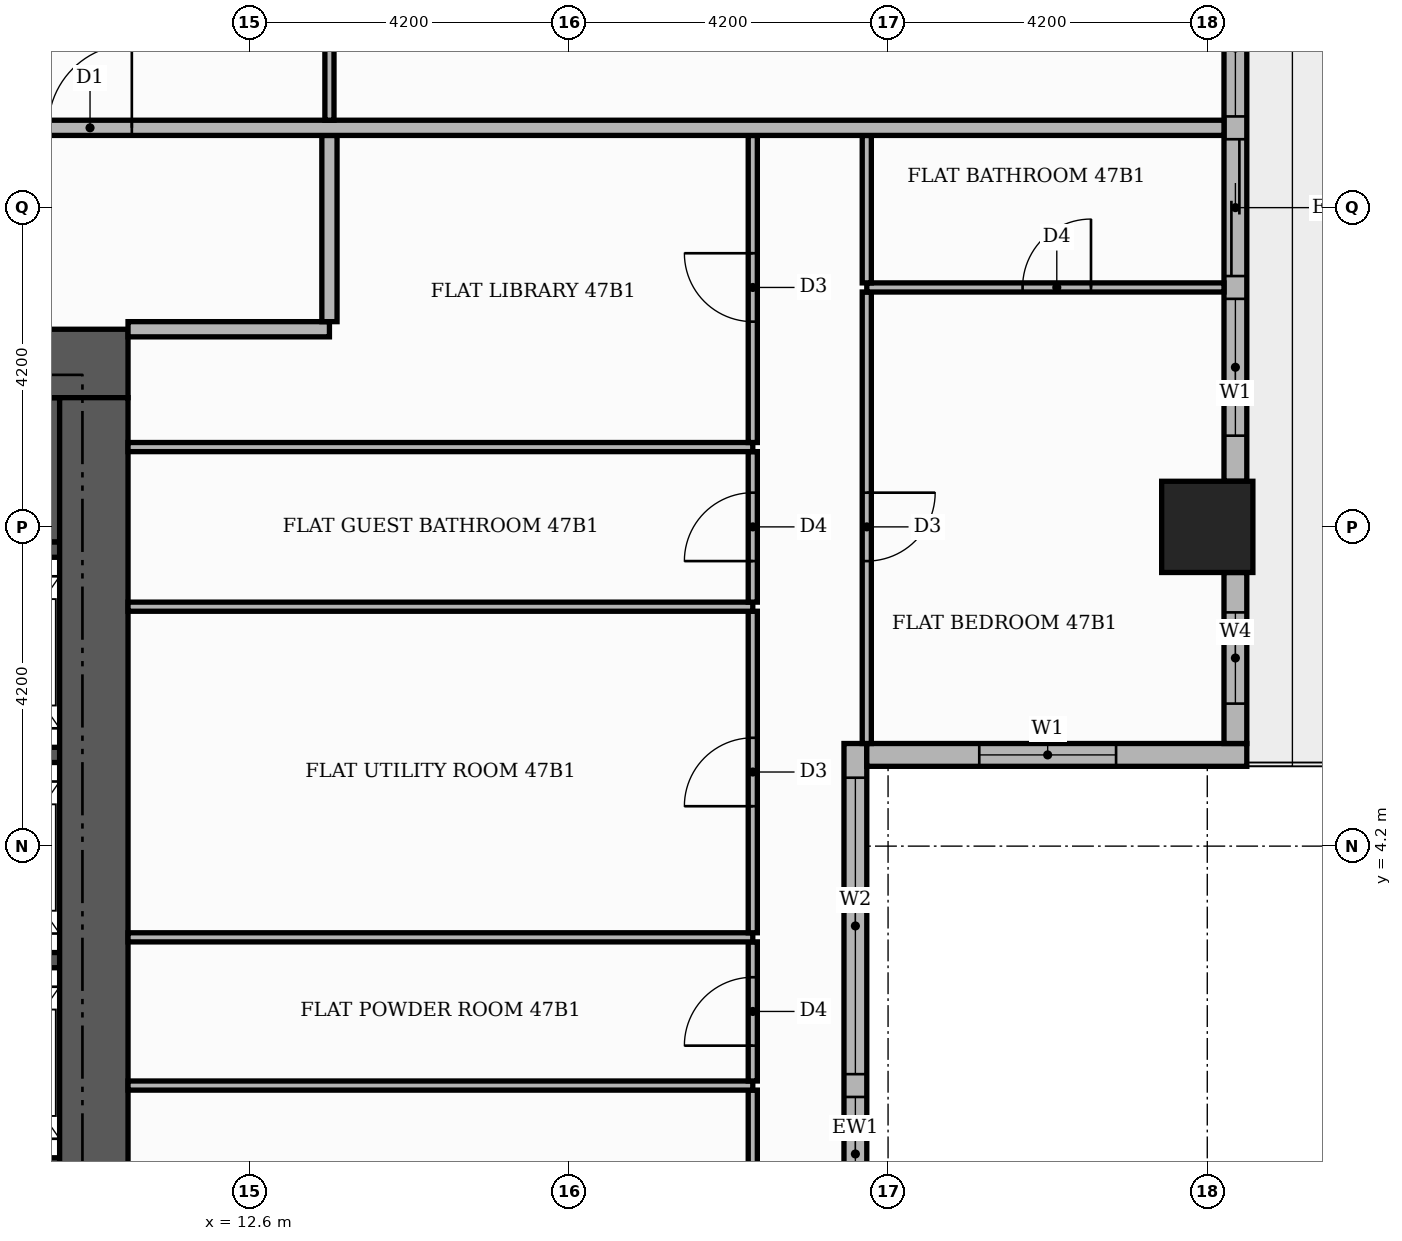
"""IFC4 building model, lengths in metres.
Left out: names, types, materials, properties, quantities, classifications, styles, units other than length and angle.
Written with IfcOpenShell. Run it as: python <this file> out.ifc"""

import sys

from ifc_helpers import new_model, si_unit, direction, frame, frame_2d, origin, origin_2d, place, context, subcontext, project, spatial, rectangle, extrude, element, fill, save


model = new_model("IFC4")
c1 = context("Model", 3, precision=1e-05, world=origin(), true_north=direction((0.0, 1.0)))
c2 = subcontext(c1, "Body", "Model", "MODEL_VIEW")
j1 = project(units=[si_unit("LENGTHUNIT", "METRE"), si_unit("PLANEANGLEUNIT", "RADIAN")], contexts=[c1])
p1 = place(None, origin())
s1 = spatial("IfcSite", under=j1, at=p1, CompositionType="ELEMENT")
p2 = place(p1, origin())
s2 = spatial("IfcBuilding", under=s1, at=p2, CompositionType="ELEMENT")
p3 = place(p2, frame((0.0, 0.0, 200.1)))
s3 = spatial("IfcBuildingStorey", under=s2, at=p3, CompositionType="ELEMENT", Elevation=200.1)
p4 = place(p3, frame((5.5, 9.15, 0.0), z_axis=(0.0, 0.0, 1.0), x_axis=(1.0, 0.0, 0.0)))
e1 = element("IfcWall", 1, at=p4, inside=s3, PredefinedType="SHEAR", context=c2, shape_type="SweptSolid", body=[
    extrude(rectangle(XDim=4.6, YDim=1.9, at=frame_2d((2.3, 0.0))), origin(), (0.0, 0.0, 1.0), 3.48),
])
for number, where, z_axis, x_axis in (
    (2, (8.1, 0.0, 0.0), (0.0, 0.0, 1.0), (1.0, 0.0, 0.0)),
    (3, (8.1, 2.7, 0.0), (0.0, 0.0, 1.0), (1.0, 0.0, 0.0)),
    (4, (8.1, 5.4, 0.0), (0.0, 0.0, 1.0), (1.0, 0.0, 0.0)),
    (5, (8.1, 8.1, 0.0), (0.0, 0.0, 1.0), (1.0, 0.0, 0.0)),
):
    element("IfcWall", number, at=place(p3, frame(where, z_axis=z_axis, x_axis=x_axis)), inside=s3, PredefinedType="SHEAR", context=c2, shape_type="SweptSolid", body=[
        extrude(rectangle(XDim=2.0, YDim=0.2, at=frame_2d((1.0, 0.0))), origin(), (0.0, 0.0, 1.0), 3.48),
    ])
p5 = place(p3, frame((-11.0, 10.55, 0.0), z_axis=(0.0, 0.0, 1.0), x_axis=(1.0, 0.0, 0.0)))
e6 = element("IfcWall", 6, at=p5, inside=s3, PredefinedType="SHEAR", context=c2, shape_type="SweptSolid", body=[
    extrude(rectangle(XDim=22.0, YDim=0.9, at=frame_2d((11.0, 0.0))), origin(), (0.0, 0.0, 1.0), 3.48),
])
p6 = place(p5, frame((13.3, 0.0, 0.0)))
e7 = element("IfcOpeningElement", 7, at=p6, cuts=e6, PredefinedType="OPENING", context=c2, shape_type="SweptSolid", body=[
    extrude(rectangle(XDim=1.8, YDim=2.2, at=frame_2d((0.9, 1.1))), frame((0.0, 0.46, 0.0), z_axis=(0.0, -1.0, 0.0), x_axis=(1.0, 0.0, 0.0)), (0.0, 0.0, 1.0), 0.92),
])
p7 = place(p3, frame((10.55, -10.1, 0.0), z_axis=(0.0, 0.0, 1.0), x_axis=(0.0, 1.0, 0.0)))
e8 = element("IfcWall", 8, at=p7, inside=s3, PredefinedType="SHEAR", context=c2, shape_type="SweptSolid", body=[
    extrude(rectangle(XDim=20.2, YDim=0.9, at=frame_2d((10.1, 0.0))), origin(), (0.0, 0.0, 1.0), 3.48),
])
p8 = place(p3, frame((25.2, 8.4, 0.0), z_axis=(0.0, 0.0, 1.0), x_axis=(1.0, 0.0, 0.0)))
e9 = element("IfcColumn", 9, at=p8, inside=s3, PredefinedType="COLUMN", context=c2, shape_type="SweptSolid", body=[
    extrude(rectangle(XDim=1.2, YDim=1.2, at=origin_2d()), origin(), (0.0, 0.0, 1.0), 3.9),
])
p9 = place(p3, frame((20.57, -5.25, 0.0), z_axis=(0.0, 0.0, 1.0), x_axis=(0.0, 1.0, 0.0)))
e10 = element("IfcWall", 10, at=p9, inside=s3, PredefinedType="STANDARD", context=c2, shape_type="SweptSolid", body=[
    extrude(rectangle(XDim=10.8, YDim=0.3, at=frame_2d((5.4, 0.0))), origin(), (0.0, 0.0, 1.0), 3.48),
])
p10 = place(p9, frame((0.15, 0.0, 0.9)))
e11 = element("IfcOpeningElement", 11, at=p10, cuts=e10, PredefinedType="OPENING", context=c2, shape_type="SweptSolid", body=[
    extrude(rectangle(XDim=6.0, YDim=2.1, at=frame_2d((3.0, 1.05))), frame((0.0, 0.16, 0.0), z_axis=(0.0, -1.0, 0.0), x_axis=(1.0, 0.0, 0.0)), (0.0, 0.0, 1.0), 0.32),
])
p11 = place(p9, frame((6.45, 0.0, 0.9)))
e12 = element("IfcOpeningElement", 12, at=p11, cuts=e10, PredefinedType="OPENING", context=c2, shape_type="SweptSolid", body=[
    extrude(rectangle(XDim=3.9, YDim=2.1, at=frame_2d((1.95, 1.05))), frame((0.0, 0.16, 0.0), z_axis=(0.0, -1.0, 0.0), x_axis=(1.0, 0.0, 0.0)), (0.0, 0.0, 1.0), 0.32),
])
p12 = place(p3, frame((20.72, 5.4, 0.0), z_axis=(0.0, 0.0, 1.0), x_axis=(1.0, 0.0, 0.0)))
e13 = element("IfcWall", 13, at=p12, inside=s3, PredefinedType="STANDARD", context=c2, shape_type="SweptSolid", body=[
    extrude(rectangle(XDim=5.0, YDim=0.3, at=frame_2d((2.5, 0.0))), origin(), (0.0, 0.0, 1.0), 3.48),
])
p13 = place(p12, frame((1.48, 0.0, 0.9)))
e14 = element("IfcOpeningElement", 14, at=p13, cuts=e13, PredefinedType="OPENING", context=c2, shape_type="SweptSolid", body=[
    extrude(rectangle(XDim=1.8, YDim=2.1, at=frame_2d((0.9, 1.05))), frame((0.0, 0.16, 0.0), z_axis=(0.0, -1.0, 0.0), x_axis=(1.0, 0.0, 0.0)), (0.0, 0.0, 1.0), 0.32),
])
p14 = place(p3, frame((25.57, 5.55, 0.0), z_axis=(0.0, 0.0, 1.0), x_axis=(0.0, 1.0, 0.0)))
e15 = element("IfcWall", 15, at=p14, inside=s3, PredefinedType="STANDARD", context=c2, shape_type="SweptSolid", body=[
    extrude(rectangle(XDim=2.25, YDim=0.3, at=frame_2d((1.125, 0.0))), origin(), (0.0, 0.0, 1.0), 3.48),
])
p15 = place(p14, frame((0.525, 0.0, 0.9)))
e16 = element("IfcOpeningElement", 16, at=p15, cuts=e15, PredefinedType="OPENING", context=c2, shape_type="SweptSolid", body=[
    extrude(rectangle(XDim=1.2, YDim=2.1, at=frame_2d((0.6, 1.05))), frame((0.0, 0.16, 0.0), z_axis=(0.0, -1.0, 0.0), x_axis=(1.0, 0.0, 0.0)), (0.0, 0.0, 1.0), 0.32),
])
p16 = place(p3, frame((25.57, 9.0, 0.0), z_axis=(0.0, 0.0, 1.0), x_axis=(0.0, 1.0, 0.0)))
e17 = element("IfcWall", 17, at=p16, inside=s3, PredefinedType="STANDARD", context=c2, shape_type="SweptSolid", body=[
    extrude(rectangle(XDim=7.2, YDim=0.3, at=frame_2d((3.6, 0.0))), origin(), (0.0, 0.0, 1.0), 3.48),
])
p17 = place(p16, frame((0.6, 0.0, 0.9)))
e18 = element("IfcOpeningElement", 18, at=p17, cuts=e17, PredefinedType="OPENING", context=c2, shape_type="SweptSolid", body=[
    extrude(rectangle(XDim=1.8, YDim=2.1, at=frame_2d((0.9, 1.05))), frame((0.0, 0.16, 0.0), z_axis=(0.0, -1.0, 0.0), x_axis=(1.0, 0.0, 0.0)), (0.0, 0.0, 1.0), 0.32),
])
p18 = place(p16, frame((2.7, 0.0, 0.0)))
e19 = element("IfcOpeningElement", 19, at=p18, cuts=e17, PredefinedType="OPENING", context=c2, shape_type="SweptSolid", body=[
    extrude(rectangle(XDim=1.8, YDim=2.4, at=frame_2d((0.9, 1.2))), frame((0.0, 0.16, 0.0), z_axis=(0.0, -1.0, 0.0), x_axis=(1.0, 0.0, 0.0)), (0.0, 0.0, 1.0), 0.32),
])
p19 = place(p16, frame((4.8, 0.0, 0.9)))
e20 = element("IfcOpeningElement", 20, at=p19, cuts=e17, PredefinedType="OPENING", context=c2, shape_type="SweptSolid", body=[
    extrude(rectangle(XDim=1.8, YDim=2.1, at=frame_2d((0.9, 1.05))), frame((0.0, 0.16, 0.0), z_axis=(0.0, -1.0, 0.0), x_axis=(1.0, 0.0, 0.0)), (0.0, 0.0, 1.0), 0.32),
])
p20 = place(p3, frame((19.22, -3.09, 0.0), z_axis=(0.0, 0.0, 1.0), x_axis=(0.0, 1.0, 0.0)))
e21 = element("IfcWall", 21, at=p20, inside=s3, PredefinedType="PARTITIONING", context=c2, shape_type="SweptSolid", body=[
    extrude(rectangle(XDim=4.08, YDim=0.12, at=frame_2d((2.04, 0.0))), origin(), (0.0, 0.0, 1.0), 3.48),
])
p21 = place(p20, frame((1.59, 0.0, 0.0)))
e22 = element("IfcOpeningElement", 22, at=p21, cuts=e21, PredefinedType="OPENING", context=c2, shape_type="SweptSolid", body=[
    extrude(rectangle(XDim=0.9, YDim=2.1, at=frame_2d((0.45, 1.05))), frame((0.0, 0.07, 0.0), z_axis=(0.0, -1.0, 0.0), x_axis=(1.0, 0.0, 0.0)), (0.0, 0.0, 1.0), 0.14),
])
p22 = place(p3, frame((11.0, 1.05, 0.0), z_axis=(0.0, 0.0, 1.0), x_axis=(1.0, 0.0, 0.0)))
e23 = element("IfcWall", 23, at=p22, inside=s3, PredefinedType="PARTITIONING", context=c2, shape_type="SweptSolid", body=[
    extrude(rectangle(XDim=8.22, YDim=0.12, at=frame_2d((4.11, 0.0))), origin(), (0.0, 0.0, 1.0), 3.48),
])
p23 = place(p3, frame((19.22, 1.11, 0.0), z_axis=(0.0, 0.0, 1.0), x_axis=(0.0, 1.0, 0.0)))
e24 = element("IfcWall", 24, at=p23, inside=s3, PredefinedType="PARTITIONING", context=c2, shape_type="SweptSolid", body=[
    extrude(rectangle(XDim=1.83, YDim=0.12, at=frame_2d((0.915, 0.0))), origin(), (0.0, 0.0, 1.0), 3.48),
])
p24 = place(p23, frame((0.465, 0.0, 0.0)))
e25 = element("IfcOpeningElement", 25, at=p24, cuts=e24, PredefinedType="OPENING", context=c2, shape_type="SweptSolid", body=[
    extrude(rectangle(XDim=0.9, YDim=2.1, at=frame_2d((0.45, 1.05))), frame((0.0, 0.07, 0.0), z_axis=(0.0, -1.0, 0.0), x_axis=(1.0, 0.0, 0.0)), (0.0, 0.0, 1.0), 0.14),
])
p25 = place(p3, frame((11.0, 3.0, 0.0), z_axis=(0.0, 0.0, 1.0), x_axis=(1.0, 0.0, 0.0)))
e26 = element("IfcWall", 26, at=p25, inside=s3, PredefinedType="PARTITIONING", context=c2, shape_type="SweptSolid", body=[
    extrude(rectangle(XDim=8.22, YDim=0.12, at=frame_2d((4.11, 0.0))), origin(), (0.0, 0.0, 1.0), 3.48),
])
p26 = place(p3, frame((19.22, 3.06, 0.0), z_axis=(0.0, 0.0, 1.0), x_axis=(0.0, 1.0, 0.0)))
e27 = element("IfcWall", 27, at=p26, inside=s3, PredefinedType="PARTITIONING", context=c2, shape_type="SweptSolid", body=[
    extrude(rectangle(XDim=4.23, YDim=0.12, at=frame_2d((2.115, 0.0))), origin(), (0.0, 0.0, 1.0), 3.48),
])
p27 = place(p26, frame((1.665, 0.0, 0.0)))
e28 = element("IfcOpeningElement", 28, at=p27, cuts=e27, PredefinedType="OPENING", context=c2, shape_type="SweptSolid", body=[
    extrude(rectangle(XDim=0.9, YDim=2.1, at=frame_2d((0.45, 1.05))), frame((0.0, 0.07, 0.0), z_axis=(0.0, -1.0, 0.0), x_axis=(1.0, 0.0, 0.0)), (0.0, 0.0, 1.0), 0.14),
])
p28 = place(p3, frame((20.72, 5.55, 0.0), z_axis=(0.0, 0.0, 1.0), x_axis=(0.0, 1.0, 0.0)))
e29 = element("IfcWall", 29, at=p28, inside=s3, PredefinedType="PARTITIONING", context=c2, shape_type="SweptSolid", body=[
    extrude(rectangle(XDim=5.94, YDim=0.12, at=frame_2d((2.97, 0.0))), origin(), (0.0, 0.0, 1.0), 3.48),
])
p29 = place(p28, frame((2.4, 0.0, 0.0)))
e30 = element("IfcOpeningElement", 30, at=p29, cuts=e29, PredefinedType="OPENING", context=c2, shape_type="SweptSolid", body=[
    extrude(rectangle(XDim=0.9, YDim=2.1, at=frame_2d((0.45, 1.05))), frame((0.0, 0.07, 0.0), z_axis=(0.0, -1.0, 0.0), x_axis=(1.0, 0.0, 0.0)), (0.0, 0.0, 1.0), 0.14),
])
p30 = place(p3, frame((11.0, 7.35, 0.0), z_axis=(0.0, 0.0, 1.0), x_axis=(1.0, 0.0, 0.0)))
e31 = element("IfcWall", 31, at=p30, inside=s3, PredefinedType="PARTITIONING", context=c2, shape_type="SweptSolid", body=[
    extrude(rectangle(XDim=8.22, YDim=0.12, at=frame_2d((4.11, 0.0))), origin(), (0.0, 0.0, 1.0), 3.48),
])
p31 = place(p3, frame((19.22, 7.41, 0.0), z_axis=(0.0, 0.0, 1.0), x_axis=(0.0, 1.0, 0.0)))
e32 = element("IfcWall", 32, at=p31, inside=s3, PredefinedType="PARTITIONING", context=c2, shape_type="SweptSolid", body=[
    extrude(rectangle(XDim=1.98, YDim=0.12, at=frame_2d((0.99, 0.0))), origin(), (0.0, 0.0, 1.0), 3.48),
])
p32 = place(p31, frame((0.54, 0.0, 0.0)))
e33 = element("IfcOpeningElement", 33, at=p32, cuts=e32, PredefinedType="OPENING", context=c2, shape_type="SweptSolid", body=[
    extrude(rectangle(XDim=0.9, YDim=2.1, at=frame_2d((0.45, 1.05))), frame((0.0, 0.07, 0.0), z_axis=(0.0, -1.0, 0.0), x_axis=(1.0, 0.0, 0.0)), (0.0, 0.0, 1.0), 0.14),
])
p33 = place(p3, frame((11.0, 9.45, 0.0), z_axis=(0.0, 0.0, 1.0), x_axis=(1.0, 0.0, 0.0)))
e34 = element("IfcWall", 34, at=p33, inside=s3, PredefinedType="PARTITIONING", context=c2, shape_type="SweptSolid", body=[
    extrude(rectangle(XDim=8.22, YDim=0.12, at=frame_2d((4.11, 0.0))), origin(), (0.0, 0.0, 1.0), 3.48),
])
p34 = place(p3, frame((19.22, 9.51, 0.0), z_axis=(0.0, 0.0, 1.0), x_axis=(0.0, 1.0, 0.0)))
e35 = element("IfcWall", 35, at=p34, inside=s3, PredefinedType="PARTITIONING", context=c2, shape_type="SweptSolid", body=[
    extrude(rectangle(XDim=4.04, YDim=0.12, at=frame_2d((2.02, 0.0))), origin(), (0.0, 0.0, 1.0), 3.48),
])
p35 = place(p34, frame((1.59, 0.0, 0.0)))
e36 = element("IfcOpeningElement", 36, at=p35, cuts=e35, PredefinedType="OPENING", context=c2, shape_type="SweptSolid", body=[
    extrude(rectangle(XDim=0.9, YDim=2.1, at=frame_2d((0.45, 1.05))), frame((0.0, 0.07, 0.0), z_axis=(0.0, -1.0, 0.0), x_axis=(1.0, 0.0, 0.0)), (0.0, 0.0, 1.0), 0.14),
])
p36 = place(p3, frame((11.0, 11.0, 0.0), z_axis=(0.0, 0.0, 1.0), x_axis=(1.0, 0.0, 0.0)))
e37 = element("IfcWall", 37, at=p36, inside=s3, PredefinedType="PARTITIONING", context=c2, shape_type="SweptSolid", body=[
    extrude(rectangle(XDim=2.65, YDim=0.2, at=frame_2d((1.325, 0.0))), origin(), (0.0, 0.0, 1.0), 3.48),
])
p37 = place(p3, frame((13.65, 11.1, 0.0), z_axis=(0.0, 0.0, 1.0), x_axis=(0.0, 1.0, 0.0)))
e38 = element("IfcWall", 38, at=p37, inside=s3, PredefinedType="PARTITIONING", context=c2, shape_type="SweptSolid", body=[
    extrude(rectangle(XDim=2.45, YDim=0.2, at=frame_2d((1.225, 0.0))), origin(), (0.0, 0.0, 1.0), 3.48),
])
p38 = place(p3, frame((20.72, 11.55, 0.0), z_axis=(0.0, 0.0, 1.0), x_axis=(1.0, 0.0, 0.0)))
e39 = element("IfcWall", 39, at=p38, inside=s3, PredefinedType="PARTITIONING", context=c2, shape_type="SweptSolid", body=[
    extrude(rectangle(XDim=4.7, YDim=0.12, at=frame_2d((2.35, 0.0))), origin(), (0.0, 0.0, 1.0), 3.48),
])
p39 = place(p38, frame((2.05, 0.0, 0.0)))
e40 = element("IfcOpeningElement", 40, at=p39, cuts=e39, PredefinedType="OPENING", context=c2, shape_type="SweptSolid", body=[
    extrude(rectangle(XDim=0.9, YDim=2.1, at=frame_2d((0.45, 1.05))), frame((0.0, 0.07, 0.0), z_axis=(0.0, -1.0, 0.0), x_axis=(1.0, 0.0, 0.0)), (0.0, 0.0, 1.0), 0.14),
])
p40 = place(p3, frame((20.72, 11.61, 0.0), z_axis=(0.0, 0.0, 1.0), x_axis=(0.0, 1.0, 0.0)))
e41 = element("IfcWall", 41, at=p40, inside=s3, PredefinedType="PARTITIONING", context=c2, shape_type="SweptSolid", body=[
    extrude(rectangle(XDim=1.94, YDim=0.12, at=frame_2d((0.97, 0.0))), origin(), (0.0, 0.0, 1.0), 3.48),
])
p41 = place(p3, frame((-13.65, 13.65, 0.0), z_axis=(0.0, 0.0, 1.0), x_axis=(1.0, 0.0, 0.0)))
e42 = element("IfcWall", 42, at=p41, inside=s3, PredefinedType="PARTITIONING", context=c2, shape_type="SweptSolid", body=[
    extrude(rectangle(XDim=39.07, YDim=0.2, at=frame_2d((19.535, 0.0))), origin(), (0.0, 0.0, 1.0), 3.48),
])
p42 = place(p41, frame((23.6, 0.0, 0.0)))
e43 = element("IfcOpeningElement", 43, at=p42, cuts=e42, PredefinedType="OPENING", context=c2, shape_type="SweptSolid", body=[
    extrude(rectangle(XDim=1.1, YDim=2.4, at=frame_2d((0.55, 1.2))), frame((0.0, 0.11, 0.0), z_axis=(0.0, -1.0, 0.0), x_axis=(1.0, 0.0, 0.0)), (0.0, 0.0, 1.0), 0.22),
])
p43 = place(p3, frame((13.65, 13.75, 0.0), z_axis=(0.0, 0.0, 1.0), x_axis=(0.0, 1.0, 0.0)))
e44 = element("IfcWall", 44, at=p43, inside=s3, PredefinedType="PARTITIONING", context=c2, shape_type="SweptSolid", body=[
    extrude(rectangle(XDim=6.01, YDim=0.12, at=frame_2d((3.005, 0.0))), origin(), (0.0, 0.0, 1.0), 3.48),
])
p44 = place(p43, frame((2.535, 0.0, 0.0)))
e45 = element("IfcOpeningElement", 45, at=p44, cuts=e44, PredefinedType="OPENING", context=c2, shape_type="SweptSolid", body=[
    extrude(rectangle(XDim=0.9, YDim=2.1, at=frame_2d((0.45, 1.05))), frame((0.0, 0.07, 0.0), z_axis=(0.0, -1.0, 0.0), x_axis=(1.0, 0.0, 0.0)), (0.0, 0.0, 1.0), 0.14),
])
p45 = place(p10, origin())
e46 = element("IfcWindow", 46, at=p45, inside=s3, PartitioningType="SINGLE_PANEL", PredefinedType="WINDOW", context=c2, shape_type="SweptSolid", body=[
    extrude(rectangle(XDim=6.0, YDim=2.1, at=frame_2d((3.0, 1.05))), frame((0.0, 0.03, 0.0), z_axis=(0.0, -1.0, 0.0), x_axis=(1.0, 0.0, 0.0)), (0.0, 0.0, 1.0), 0.06),
])
fill(e11, e46)
p46 = place(p11, origin())
e47 = element("IfcWindow", 47, at=p46, inside=s3, PartitioningType="SINGLE_PANEL", PredefinedType="WINDOW", context=c2, shape_type="SweptSolid", body=[
    extrude(rectangle(XDim=3.9, YDim=2.1, at=frame_2d((1.95, 1.05))), frame((0.0, 0.03, 0.0), z_axis=(0.0, -1.0, 0.0), x_axis=(1.0, 0.0, 0.0)), (0.0, 0.0, 1.0), 0.06),
])
fill(e12, e47)
p47 = place(p13, origin())
e48 = element("IfcWindow", 48, at=p47, inside=s3, PartitioningType="SINGLE_PANEL", PredefinedType="WINDOW", context=c2, shape_type="SweptSolid", body=[
    extrude(rectangle(XDim=1.8, YDim=2.1, at=frame_2d((0.9, 1.05))), frame((0.0, 0.03, 0.0), z_axis=(0.0, -1.0, 0.0), x_axis=(1.0, 0.0, 0.0)), (0.0, 0.0, 1.0), 0.06),
])
fill(e14, e48)
p48 = place(p15, origin())
e49 = element("IfcWindow", 49, at=p48, inside=s3, PartitioningType="SINGLE_PANEL", PredefinedType="WINDOW", context=c2, shape_type="SweptSolid", body=[
    extrude(rectangle(XDim=1.2, YDim=2.1, at=frame_2d((0.6, 1.05))), frame((0.0, 0.03, 0.0), z_axis=(0.0, -1.0, 0.0), x_axis=(1.0, 0.0, 0.0)), (0.0, 0.0, 1.0), 0.06),
])
fill(e16, e49)
p49 = place(p17, origin())
e50 = element("IfcWindow", 50, at=p49, inside=s3, PartitioningType="SINGLE_PANEL", PredefinedType="WINDOW", context=c2, shape_type="SweptSolid", body=[
    extrude(rectangle(XDim=1.8, YDim=2.1, at=frame_2d((0.9, 1.05))), frame((0.0, 0.03, 0.0), z_axis=(0.0, -1.0, 0.0), x_axis=(1.0, 0.0, 0.0)), (0.0, 0.0, 1.0), 0.06),
])
fill(e18, e50)
p50 = place(p18, origin())
e51 = element("IfcDoor", 51, at=p50, inside=s3, OperationType="SLIDING_TO_RIGHT", PredefinedType="DOOR", context=c2, shape_type="SweptSolid", body=[
    extrude(rectangle(XDim=1.8, YDim=2.4, at=frame_2d((0.9, 1.2))), frame((0.0, 0.025, 0.0), z_axis=(0.0, -1.0, 0.0), x_axis=(1.0, 0.0, 0.0)), (0.0, 0.0, 1.0), 0.05),
])
fill(e19, e51)
p51 = place(p19, origin())
e52 = element("IfcWindow", 52, at=p51, inside=s3, PartitioningType="SINGLE_PANEL", PredefinedType="WINDOW", context=c2, shape_type="SweptSolid", body=[
    extrude(rectangle(XDim=1.8, YDim=2.1, at=frame_2d((0.9, 1.05))), frame((0.0, 0.03, 0.0), z_axis=(0.0, -1.0, 0.0), x_axis=(1.0, 0.0, 0.0)), (0.0, 0.0, 1.0), 0.06),
])
fill(e20, e52)
p52 = place(p24, origin())
e53 = element("IfcDoor", 53, at=p52, inside=s3, OperationType="SINGLE_SWING_LEFT", PredefinedType="DOOR", context=c2, shape_type="SweptSolid", body=[
    extrude(rectangle(XDim=0.9, YDim=2.1, at=frame_2d((0.45, 1.05))), frame((0.0, 0.025, 0.0), z_axis=(0.0, -1.0, 0.0), x_axis=(1.0, 0.0, 0.0)), (0.0, 0.0, 1.0), 0.05),
])
fill(e25, e53)
p53 = place(p27, origin())
e54 = element("IfcDoor", 54, at=p53, inside=s3, OperationType="SINGLE_SWING_LEFT", PredefinedType="DOOR", context=c2, shape_type="SweptSolid", body=[
    extrude(rectangle(XDim=0.9, YDim=2.1, at=frame_2d((0.45, 1.05))), frame((0.0, 0.025, 0.0), z_axis=(0.0, -1.0, 0.0), x_axis=(1.0, 0.0, 0.0)), (0.0, 0.0, 1.0), 0.05),
])
fill(e28, e54)
p54 = place(p32, origin())
e55 = element("IfcDoor", 55, at=p54, inside=s3, OperationType="SINGLE_SWING_LEFT", PredefinedType="DOOR", context=c2, shape_type="SweptSolid", body=[
    extrude(rectangle(XDim=0.9, YDim=2.1, at=frame_2d((0.45, 1.05))), frame((0.0, 0.025, 0.0), z_axis=(0.0, -1.0, 0.0), x_axis=(1.0, 0.0, 0.0)), (0.0, 0.0, 1.0), 0.05),
])
fill(e33, e55)
p55 = place(p35, origin())
e56 = element("IfcDoor", 56, at=p55, inside=s3, OperationType="SINGLE_SWING_RIGHT", PredefinedType="DOOR", context=c2, shape_type="SweptSolid", body=[
    extrude(rectangle(XDim=0.9, YDim=2.1, at=frame_2d((0.45, 1.05))), frame((0.0, 0.025, 0.0), z_axis=(0.0, -1.0, 0.0), x_axis=(1.0, 0.0, 0.0)), (0.0, 0.0, 1.0), 0.05),
])
fill(e36, e56)
p56 = place(p29, frame((0.9, 0.0, 0.0), z_axis=(0.0, 0.0, 1.0), x_axis=(-1.0, 0.0, 0.0)))
e57 = element("IfcDoor", 57, at=p56, inside=s3, OperationType="SINGLE_SWING_RIGHT", PredefinedType="DOOR", context=c2, shape_type="SweptSolid", body=[
    extrude(rectangle(XDim=0.9, YDim=2.1, at=frame_2d((0.45, 1.05))), frame((0.0, 0.025, 0.0), z_axis=(0.0, -1.0, 0.0), x_axis=(1.0, 0.0, 0.0)), (0.0, 0.0, 1.0), 0.05),
])
fill(e30, e57)
p57 = place(p39, origin())
e58 = element("IfcDoor", 58, at=p57, inside=s3, OperationType="SINGLE_SWING_RIGHT", PredefinedType="DOOR", context=c2, shape_type="SweptSolid", body=[
    extrude(rectangle(XDim=0.9, YDim=2.1, at=frame_2d((0.45, 1.05))), frame((0.0, 0.025, 0.0), z_axis=(0.0, -1.0, 0.0), x_axis=(1.0, 0.0, 0.0)), (0.0, 0.0, 1.0), 0.05),
])
fill(e40, e58)
p58 = place(p42, origin())
e59 = element("IfcDoor", 59, at=p58, inside=s3, OperationType="SINGLE_SWING_RIGHT", PredefinedType="DOOR", context=c2, shape_type="SweptSolid", body=[
    extrude(rectangle(XDim=1.1, YDim=2.4, at=frame_2d((0.55, 1.2))), frame((0.0, 0.025, 0.0), z_axis=(0.0, -1.0, 0.0), x_axis=(1.0, 0.0, 0.0)), (0.0, 0.0, 1.0), 0.05),
])
fill(e43, e59)
save(model, sys.argv[1])
